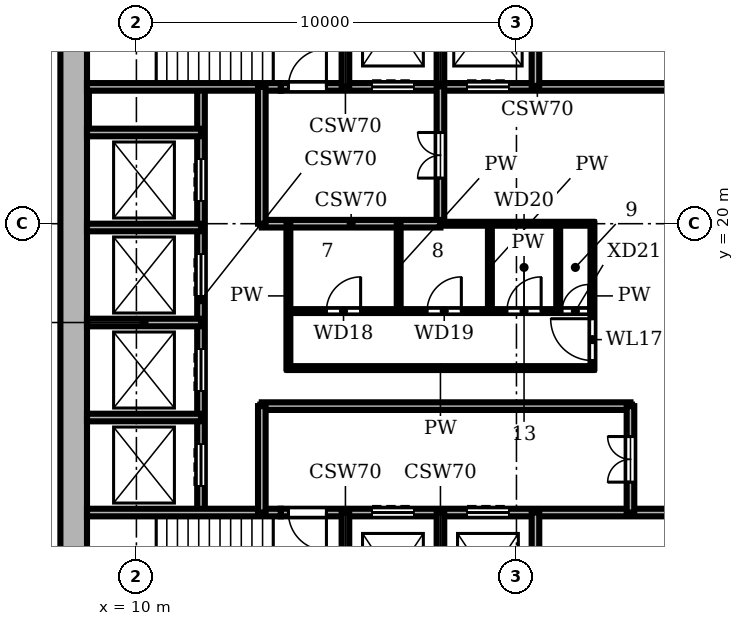
"""IFC4 building model, lengths in metres.
Left out: names, types, materials, properties, quantities, classifications, styles, units other than length and angle.
Written with IfcOpenShell. Run it as: python <this file> out.ifc"""

import sys

from ifc_helpers import new_model, si_unit, direction, frame, frame_2d, origin, place, context, subcontext, project, spatial, rectangle, extrude, element, fill, save


model = new_model("IFC4")
c1 = context("Model", 3, precision=1e-05, world=origin(), true_north=direction((0.0, 1.0)))
c2 = subcontext(c1, "Body", "Model", "MODEL_VIEW")
j1 = project(units=[si_unit("LENGTHUNIT", "METRE"), si_unit("PLANEANGLEUNIT", "RADIAN")], contexts=[c1])
p1 = place(None, origin())
s1 = spatial("IfcSite", under=j1, at=p1, CompositionType="ELEMENT")
p2 = place(p1, origin())
s2 = spatial("IfcBuilding", under=s1, at=p2, CompositionType="ELEMENT")
p3 = place(p2, frame((0.0, 0.0, 205.8)))
s3 = spatial("IfcBuildingStorey", under=s2, at=p3, CompositionType="ELEMENT", Elevation=205.8)
p4 = place(p3, frame((8.35, 27.3, 0.0), z_axis=(0.0, 0.0, 1.0), x_axis=(0.0, -1.0, 0.0)))
e1 = element("IfcWall", 1, at=p4, inside=s3, PredefinedType="SHEAR", context=c2, shape_type="SweptSolid", body=[
    extrude(rectangle(XDim=18.6, YDim=0.7, at=frame_2d((9.3, 0.0))), origin(), (0.0, 0.0, 1.0), 3.9),
])
p5 = place(p3, frame((8.7, 12.4, 0.0), z_axis=(0.0, 0.0, 1.0), x_axis=(1.0, 0.0, 0.0)))
e2 = element("IfcWall", 2, at=p5, inside=s3, PredefinedType="SHEAR", context=c2, shape_type="SweptSolid", body=[
    extrude(rectangle(XDim=5.1, YDim=0.2, at=frame_2d((2.55, 0.0))), origin(), (0.0, 0.0, 1.0), 3.58),
])
p6 = place(p3, frame((13.8, 12.4, 0.0), z_axis=(0.0, 0.0, 1.0), x_axis=(1.0, 0.0, 0.0)))
e3 = element("IfcWall", 3, at=p6, inside=s3, PredefinedType="SHEAR", context=c2, shape_type="SweptSolid", body=[
    extrude(rectangle(XDim=13.5, YDim=0.2, at=frame_2d((6.75, 0.0))), origin(), (0.0, 0.0, 1.0), 3.58),
])
p7 = place(p6, frame((2.4, 0.0, 0.0)))
e4 = element("IfcOpeningElement", 4, at=p7, cuts=e3, PredefinedType="OPENING", context=c2, shape_type="SweptSolid", body=[
    extrude(rectangle(XDim=1.1, YDim=2.1, at=frame_2d((0.55, 1.05))), frame((0.0, 0.11, 0.0), z_axis=(0.0, -1.0, 0.0), x_axis=(1.0, 0.0, 0.0)), (0.0, 0.0, 1.0), 0.22),
])
p8 = place(p6, frame((4.9, 0.0, 0.0)))
e5 = element("IfcOpeningElement", 5, at=p8, cuts=e3, PredefinedType="OPENING", context=c2, shape_type="SweptSolid", body=[
    extrude(rectangle(XDim=1.1, YDim=2.1, at=frame_2d((0.55, 1.05))), frame((0.0, 0.11, 0.0), z_axis=(0.0, -1.0, 0.0), x_axis=(1.0, 0.0, 0.0)), (0.0, 0.0, 1.0), 0.22),
])
p9 = place(p6, frame((0.2, 0.0, 0.0)))
e6 = element("IfcOpeningElement", 6, at=p9, cuts=e3, PredefinedType="OPENING", context=c2, shape_type="SweptSolid", body=[
    extrude(rectangle(XDim=1.0, YDim=2.1, at=frame_2d((0.5, 1.05))), frame((0.0, 0.11, 0.0), z_axis=(0.0, -1.0, 0.0), x_axis=(1.0, 0.0, 0.0)), (0.0, 0.0, 1.0), 0.22),
])
p10 = place(p3, frame((8.7, 14.9, 0.0), z_axis=(0.0, 0.0, 1.0), x_axis=(1.0, 0.0, 0.0)))
e7 = element("IfcWall", 7, at=p10, inside=s3, PredefinedType="SHEAR", context=c2, shape_type="SweptSolid", body=[
    extrude(rectangle(XDim=3.0, YDim=0.2, at=frame_2d((1.5, 0.0))), origin(), (0.0, 0.0, 1.0), 3.58),
])
p11 = place(p3, frame((13.3, 15.2, 0.0), z_axis=(0.0, 0.0, 1.0), x_axis=(1.0, 0.0, 0.0)))
e8 = element("IfcWall", 8, at=p11, inside=s3, PredefinedType="SHEAR", context=c2, shape_type="SweptSolid", body=[
    extrude(rectangle(XDim=9.7, YDim=0.2, at=frame_2d((4.85, 0.0))), origin(), (0.0, 0.0, 1.0), 3.58),
])
p12 = place(p3, frame((14.0, 16.2, 0.0), z_axis=(0.0, 0.0, 1.0), x_axis=(1.0, 0.0, 0.0)))
e9 = element("IfcWall", 9, at=p12, inside=s3, PredefinedType="PARTITIONING", context=c2, shape_type="SweptSolid", body=[
    extrude(rectangle(XDim=8.0, YDim=0.1, at=frame_2d((4.0, 0.0))), origin(), (0.0, 0.0, 1.0), 3.58),
])
p13 = place(p3, frame((8.7, 17.4, 0.0), z_axis=(0.0, 0.0, 1.0), x_axis=(1.0, 0.0, 0.0)))
e10 = element("IfcWall", 10, at=p13, inside=s3, PredefinedType="SHEAR", context=c2, shape_type="SweptSolid", body=[
    extrude(rectangle(XDim=3.0, YDim=0.2, at=frame_2d((1.5, 0.0))), origin(), (0.0, 0.0, 1.0), 3.58),
])
p14 = place(p3, frame((14.0, 17.7, 0.0), z_axis=(0.0, 0.0, 1.0), x_axis=(1.0, 0.0, 0.0)))
e11 = element("IfcWall", 11, at=p14, inside=s3, PredefinedType="PARTITIONING", context=c2, shape_type="SweptSolid", body=[
    extrude(rectangle(XDim=8.0, YDim=0.1, at=frame_2d((4.0, 0.0))), origin(), (0.0, 0.0, 1.0), 3.58),
])
p15 = place(p14, frame((1.0, 0.0, 0.0)))
e12 = element("IfcOpeningElement", 12, at=p15, cuts=e11, PredefinedType="OPENING", context=c2, shape_type="SweptSolid", body=[
    extrude(rectangle(XDim=0.9, YDim=2.1, at=frame_2d((0.45, 1.05))), frame((0.0, 0.06, 0.0), z_axis=(0.0, -1.0, 0.0), x_axis=(1.0, 0.0, 0.0)), (0.0, 0.0, 1.0), 0.12),
])
p16 = place(p14, frame((3.65, 0.0, 0.0)))
e13 = element("IfcOpeningElement", 13, at=p16, cuts=e11, PredefinedType="OPENING", context=c2, shape_type="SweptSolid", body=[
    extrude(rectangle(XDim=0.9, YDim=2.1, at=frame_2d((0.45, 1.05))), frame((0.0, 0.06, 0.0), z_axis=(0.0, -1.0, 0.0), x_axis=(1.0, 0.0, 0.0)), (0.0, 0.0, 1.0), 0.12),
])
p17 = place(p14, frame((5.75, 0.0, 0.0)))
e14 = element("IfcOpeningElement", 14, at=p17, cuts=e11, PredefinedType="OPENING", context=c2, shape_type="SweptSolid", body=[
    extrude(rectangle(XDim=0.9, YDim=2.1, at=frame_2d((0.45, 1.05))), frame((0.0, 0.06, 0.0), z_axis=(0.0, -1.0, 0.0), x_axis=(1.0, 0.0, 0.0)), (0.0, 0.0, 1.0), 0.12),
])
p18 = place(p14, frame((7.2, 0.0, 0.0)))
e15 = element("IfcOpeningElement", 15, at=p18, cuts=e11, PredefinedType="OPENING", context=c2, shape_type="SweptSolid", body=[
    extrude(rectangle(XDim=0.7, YDim=2.1, at=frame_2d((0.35, 1.05))), frame((0.0, 0.06, 0.0), z_axis=(0.0, -1.0, 0.0), x_axis=(1.0, 0.0, 0.0)), (0.0, 0.0, 1.0), 0.12),
])
p19 = place(p3, frame((8.7, 19.9, 0.0), z_axis=(0.0, 0.0, 1.0), x_axis=(1.0, 0.0, 0.0)))
e16 = element("IfcWall", 16, at=p19, inside=s3, PredefinedType="SHEAR", context=c2, shape_type="SweptSolid", body=[
    extrude(rectangle(XDim=3.0, YDim=0.2, at=frame_2d((1.5, 0.0))), origin(), (0.0, 0.0, 1.0), 3.58),
])
p20 = place(p3, frame((18.0, 20.0, 0.0), z_axis=(0.0, 0.0, 1.0), x_axis=(1.0, 0.0, 0.0)))
e17 = element("IfcWall", 17, at=p20, inside=s3, PredefinedType="PARTITIONING", context=c2, shape_type="SweptSolid", body=[
    extrude(rectangle(XDim=4.0, YDim=0.1, at=frame_2d((2.0, 0.0))), origin(), (0.0, 0.0, 1.0), 3.58),
])
p21 = place(p3, frame((13.3, 20.0, 0.0), z_axis=(0.0, 0.0, 1.0), x_axis=(1.0, 0.0, 0.0)))
e18 = element("IfcWall", 18, at=p21, inside=s3, PredefinedType="SHEAR", context=c2, shape_type="SweptSolid", body=[
    extrude(rectangle(XDim=4.7, YDim=0.2, at=frame_2d((2.35, 0.0))), origin(), (0.0, 0.0, 1.0), 3.58),
])
p22 = place(p3, frame((8.7, 22.4, 0.0), z_axis=(0.0, 0.0, 1.0), x_axis=(1.0, 0.0, 0.0)))
e19 = element("IfcWall", 19, at=p22, inside=s3, PredefinedType="SHEAR", context=c2, shape_type="SweptSolid", body=[
    extrude(rectangle(XDim=3.0, YDim=0.2, at=frame_2d((1.5, 0.0))), origin(), (0.0, 0.0, 1.0), 3.58),
])
p23 = place(p3, frame((8.7, 23.6, 0.0), z_axis=(0.0, 0.0, 1.0), x_axis=(1.0, 0.0, 0.0)))
e20 = element("IfcWall", 20, at=p23, inside=s3, PredefinedType="SHEAR", context=c2, shape_type="SweptSolid", body=[
    extrude(rectangle(XDim=5.1, YDim=0.2, at=frame_2d((2.55, 0.0))), origin(), (0.0, 0.0, 1.0), 3.58),
])
p24 = place(p3, frame((13.8, 23.6, 0.0), z_axis=(0.0, 0.0, 1.0), x_axis=(1.0, 0.0, 0.0)))
e21 = element("IfcWall", 21, at=p24, inside=s3, PredefinedType="SHEAR", context=c2, shape_type="SweptSolid", body=[
    extrude(rectangle(XDim=13.5, YDim=0.2, at=frame_2d((6.75, 0.0))), origin(), (0.0, 0.0, 1.0), 3.58),
])
p25 = place(p24, frame((2.4, 0.0, 0.0)))
e22 = element("IfcOpeningElement", 22, at=p25, cuts=e21, PredefinedType="OPENING", context=c2, shape_type="SweptSolid", body=[
    extrude(rectangle(XDim=1.1, YDim=2.1, at=frame_2d((0.55, 1.05))), frame((0.0, 0.11, 0.0), z_axis=(0.0, -1.0, 0.0), x_axis=(1.0, 0.0, 0.0)), (0.0, 0.0, 1.0), 0.22),
])
p26 = place(p24, frame((4.9, 0.0, 0.0)))
e23 = element("IfcOpeningElement", 23, at=p26, cuts=e21, PredefinedType="OPENING", context=c2, shape_type="SweptSolid", body=[
    extrude(rectangle(XDim=1.1, YDim=2.1, at=frame_2d((0.55, 1.05))), frame((0.0, 0.11, 0.0), z_axis=(0.0, -1.0, 0.0), x_axis=(1.0, 0.0, 0.0)), (0.0, 0.0, 1.0), 0.22),
])
p27 = place(p24, frame((0.2, 0.0, 0.0)))
e24 = element("IfcOpeningElement", 24, at=p27, cuts=e21, PredefinedType="OPENING", context=c2, shape_type="SweptSolid", body=[
    extrude(rectangle(XDim=1.0, YDim=2.1, at=frame_2d((0.5, 1.05))), frame((0.0, 0.11, 0.0), z_axis=(0.0, -1.0, 0.0), x_axis=(1.0, 0.0, 0.0)), (0.0, 0.0, 1.0), 0.22),
])
p28 = place(p3, frame((11.7, 12.4, 0.0), z_axis=(0.0, 0.0, 1.0), x_axis=(0.0, 1.0, 0.0)))
e25 = element("IfcWall", 25, at=p28, inside=s3, PredefinedType="SHEAR", context=c2, shape_type="SweptSolid", body=[
    extrude(rectangle(XDim=11.2, YDim=0.2, at=frame_2d((5.6, 0.0))), origin(), (0.0, 0.0, 1.0), 3.58),
])
p29 = place(p28, frame((0.7, 0.0, 0.0)))
e26 = element("IfcOpeningElement", 26, at=p29, cuts=e25, PredefinedType="OPENING", context=c2, shape_type="SweptSolid", body=[
    extrude(rectangle(XDim=1.1, YDim=2.1, at=frame_2d((0.55, 1.05))), frame((0.0, 0.11, 0.0), z_axis=(0.0, -1.0, 0.0), x_axis=(1.0, 0.0, 0.0)), (0.0, 0.0, 1.0), 0.22),
])
p30 = place(p28, frame((3.2, 0.0, 0.0)))
e27 = element("IfcOpeningElement", 27, at=p30, cuts=e25, PredefinedType="OPENING", context=c2, shape_type="SweptSolid", body=[
    extrude(rectangle(XDim=1.1, YDim=2.1, at=frame_2d((0.55, 1.05))), frame((0.0, 0.11, 0.0), z_axis=(0.0, -1.0, 0.0), x_axis=(1.0, 0.0, 0.0)), (0.0, 0.0, 1.0), 0.22),
])
p31 = place(p28, frame((5.7, 0.0, 0.0)))
e28 = element("IfcOpeningElement", 28, at=p31, cuts=e25, PredefinedType="OPENING", context=c2, shape_type="SweptSolid", body=[
    extrude(rectangle(XDim=1.1, YDim=2.1, at=frame_2d((0.55, 1.05))), frame((0.0, 0.11, 0.0), z_axis=(0.0, -1.0, 0.0), x_axis=(1.0, 0.0, 0.0)), (0.0, 0.0, 1.0), 0.22),
])
p32 = place(p28, frame((8.2, 0.0, 0.0)))
e29 = element("IfcOpeningElement", 29, at=p32, cuts=e25, PredefinedType="OPENING", context=c2, shape_type="SweptSolid", body=[
    extrude(rectangle(XDim=1.1, YDim=2.1, at=frame_2d((0.55, 1.05))), frame((0.0, 0.11, 0.0), z_axis=(0.0, -1.0, 0.0), x_axis=(1.0, 0.0, 0.0)), (0.0, 0.0, 1.0), 0.22),
])
p33 = place(p3, frame((13.3, 12.4, 0.0), z_axis=(0.0, 0.0, 1.0), x_axis=(0.0, 1.0, 0.0)))
e30 = element("IfcWall", 30, at=p33, inside=s3, PredefinedType="SHEAR", context=c2, shape_type="SweptSolid", body=[
    extrude(rectangle(XDim=2.8, YDim=0.2, at=frame_2d((1.4, 0.0))), origin(), (0.0, 0.0, 1.0), 3.58),
])
p34 = place(p3, frame((13.3, 20.0, 0.0), z_axis=(0.0, 0.0, 1.0), x_axis=(0.0, 1.0, 0.0)))
e31 = element("IfcWall", 31, at=p34, inside=s3, PredefinedType="SHEAR", context=c2, shape_type="SweptSolid", body=[
    extrude(rectangle(XDim=3.6, YDim=0.2, at=frame_2d((1.8, 0.0))), origin(), (0.0, 0.0, 1.0), 3.58),
])
p35 = place(p3, frame((14.0, 16.2, 0.0), z_axis=(0.0, 0.0, 1.0), x_axis=(0.0, 1.0, 0.0)))
e32 = element("IfcWall", 32, at=p35, inside=s3, PredefinedType="PARTITIONING", context=c2, shape_type="SweptSolid", body=[
    extrude(rectangle(XDim=3.8, YDim=0.1, at=frame_2d((1.9, 0.0))), origin(), (0.0, 0.0, 1.0), 3.58),
])
for number, where, z_axis, x_axis in (
    (33, (15.5, 8.7, 0.0), (0.0, 0.0, 1.0), (0.0, 1.0, 0.0)),
    (34, (15.5, 23.6, 0.0), (0.0, 0.0, 1.0), (0.0, 1.0, 0.0)),
):
    element("IfcWall", number, at=place(p3, frame(where, z_axis=z_axis, x_axis=x_axis)), inside=s3, PredefinedType="SHEAR", context=c2, shape_type="SweptSolid", body=[
        extrude(rectangle(XDim=3.7, YDim=0.2, at=frame_2d((1.85, 0.0))), origin(), (0.0, 0.0, 1.0), 3.58),
    ])
p36 = place(p3, frame((16.9, 17.7, 0.0), z_axis=(0.0, 0.0, 1.0), x_axis=(0.0, 1.0, 0.0)))
e35 = element("IfcWall", 35, at=p36, inside=s3, PredefinedType="PARTITIONING", context=c2, shape_type="SweptSolid", body=[
    extrude(rectangle(XDim=2.3, YDim=0.1, at=frame_2d((1.15, 0.0))), origin(), (0.0, 0.0, 1.0), 3.58),
])
p37 = place(p3, frame((18.0, 8.7, 0.0), z_axis=(0.0, 0.0, 1.0), x_axis=(0.0, 1.0, 0.0)))
e36 = element("IfcWall", 36, at=p37, inside=s3, PredefinedType="SHEAR", context=c2, shape_type="SweptSolid", body=[
    extrude(rectangle(XDim=3.7, YDim=0.2, at=frame_2d((1.85, 0.0))), origin(), (0.0, 0.0, 1.0), 3.58),
])
p38 = place(p3, frame((18.0, 20.0, 0.0), z_axis=(0.0, 0.0, 1.0), x_axis=(0.0, 1.0, 0.0)))
e37 = element("IfcWall", 37, at=p38, inside=s3, PredefinedType="SHEAR", context=c2, shape_type="SweptSolid", body=[
    extrude(rectangle(XDim=7.3, YDim=0.2, at=frame_2d((3.65, 0.0))), origin(), (0.0, 0.0, 1.0), 3.58),
])
p39 = place(p38, frame((1.2, 0.0, 0.0)))
e38 = element("IfcOpeningElement", 38, at=p39, cuts=e37, PredefinedType="OPENING", context=c2, shape_type="SweptSolid", body=[
    extrude(rectangle(XDim=1.2, YDim=2.1, at=frame_2d((0.6, 1.05))), frame((0.0, 0.11, 0.0), z_axis=(0.0, -1.0, 0.0), x_axis=(1.0, 0.0, 0.0)), (0.0, 0.0, 1.0), 0.22),
])
p40 = place(p3, frame((19.3, 17.7, 0.0), z_axis=(0.0, 0.0, 1.0), x_axis=(0.0, 1.0, 0.0)))
e39 = element("IfcWall", 39, at=p40, inside=s3, PredefinedType="PARTITIONING", context=c2, shape_type="SweptSolid", body=[
    extrude(rectangle(XDim=2.3, YDim=0.1, at=frame_2d((1.15, 0.0))), origin(), (0.0, 0.0, 1.0), 3.58),
])
for number, where, z_axis, x_axis in (
    (40, (20.5, 8.7, 0.0), (0.0, 0.0, 1.0), (0.0, 1.0, 0.0)),
    (41, (20.5, 23.6, 0.0), (0.0, 0.0, 1.0), (0.0, 1.0, 0.0)),
):
    element("IfcWall", number, at=place(p3, frame(where, z_axis=z_axis, x_axis=x_axis)), inside=s3, PredefinedType="SHEAR", context=c2, shape_type="SweptSolid", body=[
        extrude(rectangle(XDim=3.7, YDim=0.2, at=frame_2d((1.85, 0.0))), origin(), (0.0, 0.0, 1.0), 3.58),
    ])
p41 = place(p3, frame((21.1, 17.7, 0.0), z_axis=(0.0, 0.0, 1.0), x_axis=(0.0, 1.0, 0.0)))
e42 = element("IfcWall", 42, at=p41, inside=s3, PredefinedType="PARTITIONING", context=c2, shape_type="SweptSolid", body=[
    extrude(rectangle(XDim=2.3, YDim=0.1, at=frame_2d((1.15, 0.0))), origin(), (0.0, 0.0, 1.0), 3.58),
])
p42 = place(p3, frame((22.0, 16.2, 0.0), z_axis=(0.0, 0.0, 1.0), x_axis=(0.0, 1.0, 0.0)))
e43 = element("IfcWall", 43, at=p42, inside=s3, PredefinedType="PARTITIONING", context=c2, shape_type="SweptSolid", body=[
    extrude(rectangle(XDim=3.8, YDim=0.1, at=frame_2d((1.9, 0.0))), origin(), (0.0, 0.0, 1.0), 3.58),
])
p43 = place(p42, frame((0.2, 0.0, 0.0)))
e44 = element("IfcOpeningElement", 44, at=p43, cuts=e43, PredefinedType="OPENING", context=c2, shape_type="SweptSolid", body=[
    extrude(rectangle(XDim=1.1, YDim=2.1, at=frame_2d((0.55, 1.05))), frame((0.0, 0.06, 0.0), z_axis=(0.0, -1.0, 0.0), x_axis=(1.0, 0.0, 0.0)), (0.0, 0.0, 1.0), 0.12),
])
p44 = place(p3, frame((23.0, 12.4, 0.0), z_axis=(0.0, 0.0, 1.0), x_axis=(0.0, 1.0, 0.0)))
e45 = element("IfcWall", 45, at=p44, inside=s3, PredefinedType="SHEAR", context=c2, shape_type="SweptSolid", body=[
    extrude(rectangle(XDim=2.8, YDim=0.2, at=frame_2d((1.4, 0.0))), origin(), (0.0, 0.0, 1.0), 3.58),
])
p45 = place(p44, frame((0.8, 0.0, 0.0)))
e46 = element("IfcOpeningElement", 46, at=p45, cuts=e45, PredefinedType="OPENING", context=c2, shape_type="SweptSolid", body=[
    extrude(rectangle(XDim=1.2, YDim=2.1, at=frame_2d((0.6, 1.05))), frame((0.0, 0.11, 0.0), z_axis=(0.0, -1.0, 0.0), x_axis=(1.0, 0.0, 0.0)), (0.0, 0.0, 1.0), 0.22),
])
p46 = place(p29, origin())
e47 = element("IfcDoor", 47, at=p46, inside=s3, OperationType="DOUBLE_DOOR_SLIDING", PredefinedType="DOOR", context=c2, shape_type="SweptSolid", body=[
    extrude(rectangle(XDim=1.1, YDim=2.1, at=frame_2d((0.55, 1.05))), frame((0.0, 0.025, 0.0), z_axis=(0.0, -1.0, 0.0), x_axis=(1.0, 0.0, 0.0)), (0.0, 0.0, 1.0), 0.05),
])
fill(e26, e47)
p47 = place(p30, origin())
e48 = element("IfcDoor", 48, at=p47, inside=s3, OperationType="DOUBLE_DOOR_SLIDING", PredefinedType="DOOR", context=c2, shape_type="SweptSolid", body=[
    extrude(rectangle(XDim=1.1, YDim=2.1, at=frame_2d((0.55, 1.05))), frame((0.0, 0.025, 0.0), z_axis=(0.0, -1.0, 0.0), x_axis=(1.0, 0.0, 0.0)), (0.0, 0.0, 1.0), 0.05),
])
fill(e27, e48)
p48 = place(p31, origin())
e49 = element("IfcDoor", 49, at=p48, inside=s3, OperationType="DOUBLE_DOOR_SLIDING", PredefinedType="DOOR", context=c2, shape_type="SweptSolid", body=[
    extrude(rectangle(XDim=1.1, YDim=2.1, at=frame_2d((0.55, 1.05))), frame((0.0, 0.025, 0.0), z_axis=(0.0, -1.0, 0.0), x_axis=(1.0, 0.0, 0.0)), (0.0, 0.0, 1.0), 0.05),
])
fill(e28, e49)
p49 = place(p32, origin())
e50 = element("IfcDoor", 50, at=p49, inside=s3, OperationType="DOUBLE_DOOR_SLIDING", PredefinedType="DOOR", context=c2, shape_type="SweptSolid", body=[
    extrude(rectangle(XDim=1.1, YDim=2.1, at=frame_2d((0.55, 1.05))), frame((0.0, 0.025, 0.0), z_axis=(0.0, -1.0, 0.0), x_axis=(1.0, 0.0, 0.0)), (0.0, 0.0, 1.0), 0.05),
])
fill(e29, e50)
p50 = place(p7, origin())
e51 = element("IfcDoor", 51, at=p50, inside=s3, OperationType="DOUBLE_DOOR_SLIDING", PredefinedType="DOOR", context=c2, shape_type="SweptSolid", body=[
    extrude(rectangle(XDim=1.1, YDim=2.1, at=frame_2d((0.55, 1.05))), frame((0.0, 0.025, 0.0), z_axis=(0.0, -1.0, 0.0), x_axis=(1.0, 0.0, 0.0)), (0.0, 0.0, 1.0), 0.05),
])
fill(e4, e51)
p51 = place(p8, origin())
e52 = element("IfcDoor", 52, at=p51, inside=s3, OperationType="DOUBLE_DOOR_SLIDING", PredefinedType="DOOR", context=c2, shape_type="SweptSolid", body=[
    extrude(rectangle(XDim=1.1, YDim=2.1, at=frame_2d((0.55, 1.05))), frame((0.0, 0.025, 0.0), z_axis=(0.0, -1.0, 0.0), x_axis=(1.0, 0.0, 0.0)), (0.0, 0.0, 1.0), 0.05),
])
fill(e5, e52)
p52 = place(p25, origin())
e53 = element("IfcDoor", 53, at=p52, inside=s3, OperationType="DOUBLE_DOOR_SLIDING", PredefinedType="DOOR", context=c2, shape_type="SweptSolid", body=[
    extrude(rectangle(XDim=1.1, YDim=2.1, at=frame_2d((0.55, 1.05))), frame((0.0, 0.025, 0.0), z_axis=(0.0, -1.0, 0.0), x_axis=(1.0, 0.0, 0.0)), (0.0, 0.0, 1.0), 0.05),
])
fill(e22, e53)
p53 = place(p26, origin())
e54 = element("IfcDoor", 54, at=p53, inside=s3, OperationType="DOUBLE_DOOR_SLIDING", PredefinedType="DOOR", context=c2, shape_type="SweptSolid", body=[
    extrude(rectangle(XDim=1.1, YDim=2.1, at=frame_2d((0.55, 1.05))), frame((0.0, 0.025, 0.0), z_axis=(0.0, -1.0, 0.0), x_axis=(1.0, 0.0, 0.0)), (0.0, 0.0, 1.0), 0.05),
])
fill(e23, e54)
p54 = place(p9, frame((1.0, 0.0, 0.0), z_axis=(0.0, 0.0, 1.0), x_axis=(-1.0, 0.0, 0.0)))
e55 = element("IfcDoor", 55, at=p54, inside=s3, OperationType="SINGLE_SWING_LEFT", PredefinedType="DOOR", context=c2, shape_type="SweptSolid", body=[
    extrude(rectangle(XDim=1.0, YDim=2.1, at=frame_2d((0.5, 1.05))), frame((0.0, 0.025, 0.0), z_axis=(0.0, -1.0, 0.0), x_axis=(1.0, 0.0, 0.0)), (0.0, 0.0, 1.0), 0.05),
])
fill(e6, e55)
p55 = place(p27, origin())
e56 = element("IfcDoor", 56, at=p55, inside=s3, OperationType="SINGLE_SWING_RIGHT", PredefinedType="DOOR", context=c2, shape_type="SweptSolid", body=[
    extrude(rectangle(XDim=1.0, YDim=2.1, at=frame_2d((0.5, 1.05))), frame((0.0, 0.025, 0.0), z_axis=(0.0, -1.0, 0.0), x_axis=(1.0, 0.0, 0.0)), (0.0, 0.0, 1.0), 0.05),
])
fill(e24, e56)
p56 = place(p45, origin())
e57 = element("IfcDoor", 57, at=p56, inside=s3, OperationType="DOUBLE_DOOR_SINGLE_SWING", PredefinedType="DOOR", context=c2, shape_type="SweptSolid", body=[
    extrude(rectangle(XDim=1.2, YDim=2.1, at=frame_2d((0.6, 1.05))), frame((0.0, 0.025, 0.0), z_axis=(0.0, -1.0, 0.0), x_axis=(1.0, 0.0, 0.0)), (0.0, 0.0, 1.0), 0.05),
])
fill(e46, e57)
p57 = place(p39, origin())
e58 = element("IfcDoor", 58, at=p57, inside=s3, OperationType="DOUBLE_DOOR_SINGLE_SWING", PredefinedType="DOOR", context=c2, shape_type="SweptSolid", body=[
    extrude(rectangle(XDim=1.2, YDim=2.1, at=frame_2d((0.6, 1.05))), frame((0.0, 0.025, 0.0), z_axis=(0.0, -1.0, 0.0), x_axis=(1.0, 0.0, 0.0)), (0.0, 0.0, 1.0), 0.05),
])
fill(e38, e58)
p58 = place(p43, origin())
e59 = element("IfcDoor", 59, at=p58, inside=s3, OperationType="SINGLE_SWING_RIGHT", PredefinedType="DOOR", context=c2, shape_type="SweptSolid", body=[
    extrude(rectangle(XDim=1.1, YDim=2.1, at=frame_2d((0.55, 1.05))), frame((0.0, 0.025, 0.0), z_axis=(0.0, -1.0, 0.0), x_axis=(1.0, 0.0, 0.0)), (0.0, 0.0, 1.0), 0.05),
])
fill(e44, e59)
p59 = place(p15, origin())
e60 = element("IfcDoor", 60, at=p59, inside=s3, OperationType="SINGLE_SWING_RIGHT", PredefinedType="DOOR", context=c2, shape_type="SweptSolid", body=[
    extrude(rectangle(XDim=0.9, YDim=2.1, at=frame_2d((0.45, 1.05))), frame((0.0, 0.025, 0.0), z_axis=(0.0, -1.0, 0.0), x_axis=(1.0, 0.0, 0.0)), (0.0, 0.0, 1.0), 0.05),
])
fill(e12, e60)
p60 = place(p16, origin())
e61 = element("IfcDoor", 61, at=p60, inside=s3, OperationType="SINGLE_SWING_RIGHT", PredefinedType="DOOR", context=c2, shape_type="SweptSolid", body=[
    extrude(rectangle(XDim=0.9, YDim=2.1, at=frame_2d((0.45, 1.05))), frame((0.0, 0.025, 0.0), z_axis=(0.0, -1.0, 0.0), x_axis=(1.0, 0.0, 0.0)), (0.0, 0.0, 1.0), 0.05),
])
fill(e13, e61)
p61 = place(p17, origin())
e62 = element("IfcDoor", 62, at=p61, inside=s3, OperationType="SINGLE_SWING_RIGHT", PredefinedType="DOOR", context=c2, shape_type="SweptSolid", body=[
    extrude(rectangle(XDim=0.9, YDim=2.1, at=frame_2d((0.45, 1.05))), frame((0.0, 0.025, 0.0), z_axis=(0.0, -1.0, 0.0), x_axis=(1.0, 0.0, 0.0)), (0.0, 0.0, 1.0), 0.05),
])
fill(e14, e62)
p62 = place(p18, origin())
e63 = element("IfcDoor", 63, at=p62, inside=s3, OperationType="SINGLE_SWING_RIGHT", PredefinedType="DOOR", context=c2, shape_type="SweptSolid", body=[
    extrude(rectangle(XDim=0.7, YDim=2.1, at=frame_2d((0.35, 1.05))), frame((0.0, 0.025, 0.0), z_axis=(0.0, -1.0, 0.0), x_axis=(1.0, 0.0, 0.0)), (0.0, 0.0, 1.0), 0.05),
])
fill(e15, e63)
save(model, sys.argv[1])
